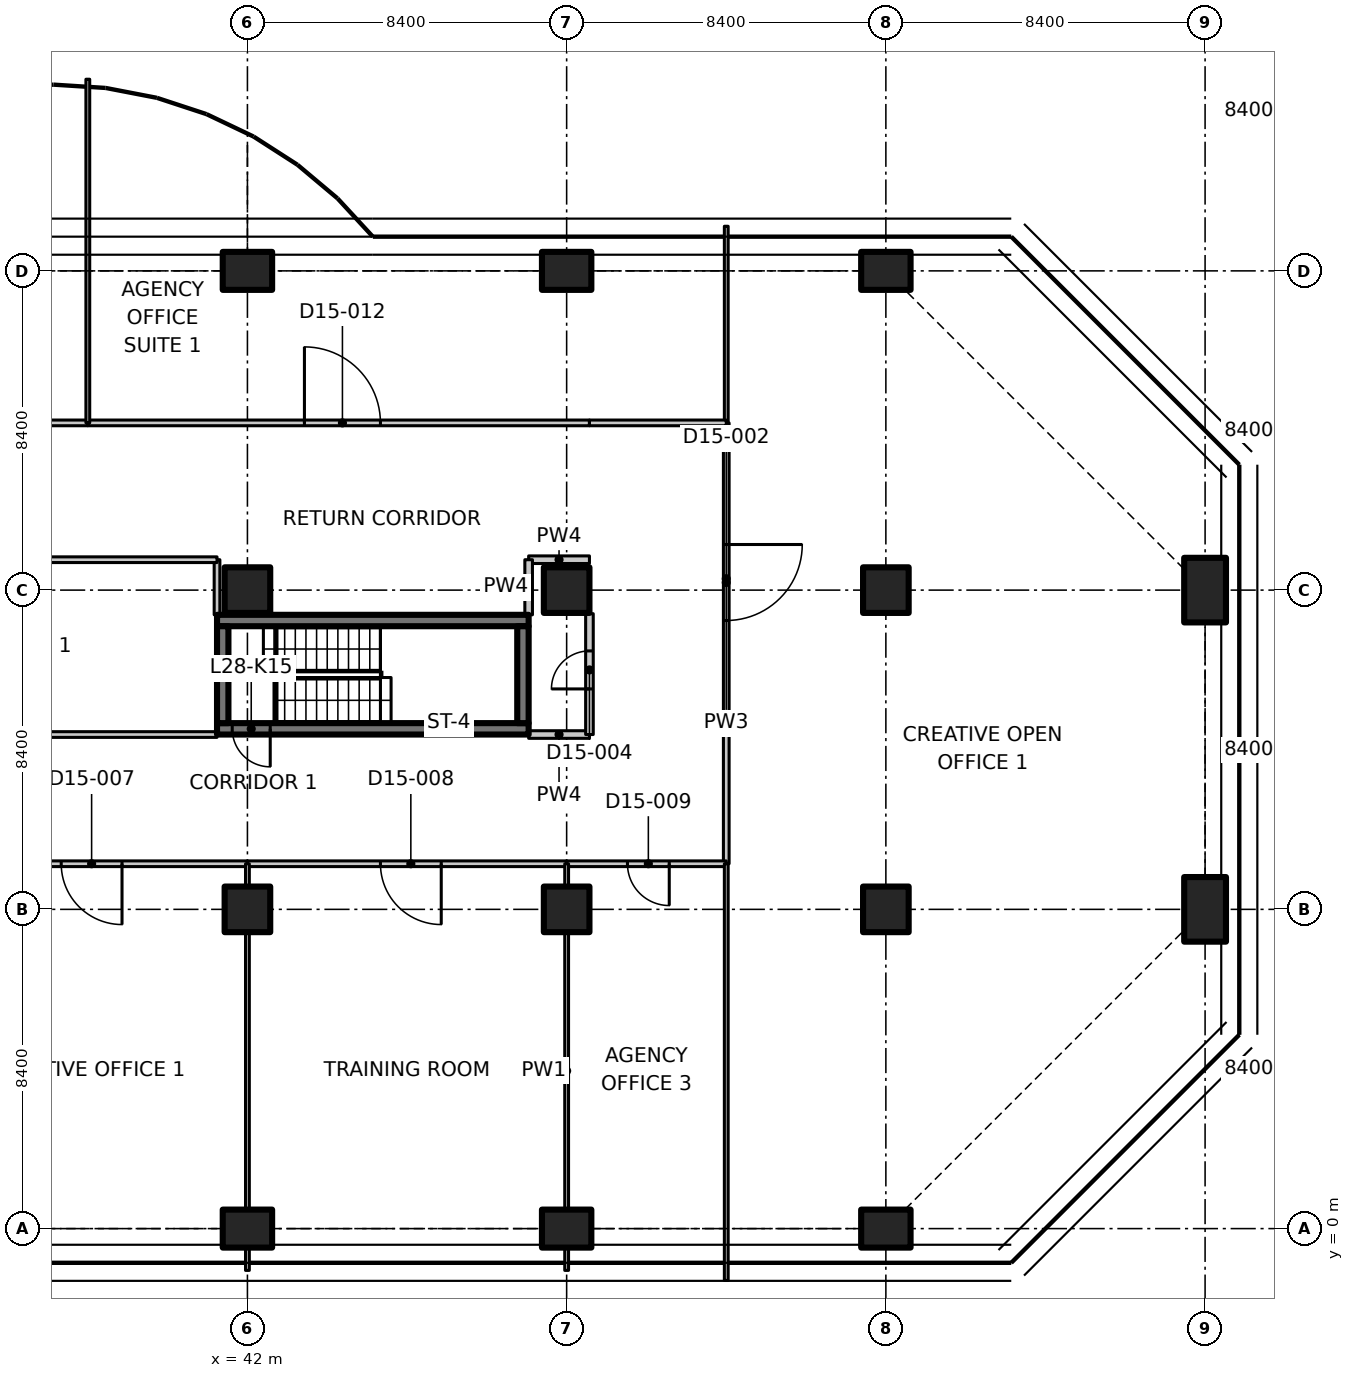
"""IFC4 building model, lengths in metres.
Left out: names, types, materials, properties, quantities, classifications, styles, units other than length and angle.
Written with IfcOpenShell. Run it as: python <this file> out.ifc"""

import sys

from ifc_helpers import new_model, si_unit, direction, frame, frame_2d, origin, origin_2d, place, context, subcontext, project, spatial, polyline, rectangle, outline, extrude, element, fill, save


model = new_model("IFC4")
c1 = context("Model", 3, precision=1e-05, world=origin(), true_north=direction((0.0, 1.0)))
c2 = subcontext(c1, "Body", "Model", "MODEL_VIEW")
j1 = project(units=[si_unit("LENGTHUNIT", "METRE"), si_unit("PLANEANGLEUNIT", "RADIAN")], contexts=[c1])
p1 = place(None, origin())
s1 = spatial("IfcSite", under=j1, at=p1, CompositionType="ELEMENT")
p2 = place(p1, origin())
s2 = spatial("IfcBuilding", under=s1, at=p2, CompositionType="ELEMENT")
p3 = place(p2, frame((0.0, 0.0, 116.9)))
s3 = spatial("IfcBuildingStorey", under=s2, at=p3, CompositionType="ELEMENT", Elevation=116.9)
p4 = place(p3, frame((42.0, 0.0, 0.0), z_axis=(0.0, 0.0, 1.0), x_axis=(0.0, 1.0, 0.0)))
e1 = element("IfcColumn", 1, at=p4, inside=s3, PredefinedType="COLUMN", context=c2, shape_type="SweptSolid", body=[
    extrude(rectangle(XDim=1.0, YDim=1.3, at=origin_2d()), origin(), (0.0, 0.0, 1.0), 3.35),
])
for number, where, z_axis, x_axis in (
    (2, (42.0, 8.4, 0.0), (0.0, 0.0, 1.0), (1.0, 0.0, 0.0)),
    (3, (42.0, 16.8, 0.0), (0.0, 0.0, 1.0), (1.0, 0.0, 0.0)),
):
    element("IfcColumn", number, at=place(p3, frame(where, z_axis=z_axis, x_axis=x_axis)), inside=s3, PredefinedType="COLUMN", context=c2, shape_type="SweptSolid", body=[
        extrude(rectangle(XDim=1.2, YDim=1.2, at=origin_2d()), origin(), (0.0, 0.0, 1.0), 3.35),
    ])
for number, where, z_axis, x_axis in (
    (4, (42.0, 25.2, 0.0), (0.0, 0.0, 1.0), (0.0, 1.0, 0.0)),
    (5, (50.4, 0.0, 0.0), (0.0, 0.0, 1.0), (0.0, 1.0, 0.0)),
):
    element("IfcColumn", number, at=place(p3, frame(where, z_axis=z_axis, x_axis=x_axis)), inside=s3, PredefinedType="COLUMN", context=c2, shape_type="SweptSolid", body=[
        extrude(rectangle(XDim=1.0, YDim=1.3, at=origin_2d()), origin(), (0.0, 0.0, 1.0), 3.35),
    ])
for number, where, z_axis, x_axis in (
    (6, (50.4, 8.4, 0.0), (0.0, 0.0, 1.0), (1.0, 0.0, 0.0)),
    (7, (50.4, 16.8, 0.0), (0.0, 0.0, 1.0), (1.0, 0.0, 0.0)),
):
    element("IfcColumn", number, at=place(p3, frame(where, z_axis=z_axis, x_axis=x_axis)), inside=s3, PredefinedType="COLUMN", context=c2, shape_type="SweptSolid", body=[
        extrude(rectangle(XDim=1.2, YDim=1.2, at=origin_2d()), origin(), (0.0, 0.0, 1.0), 3.35),
    ])
for number, where, z_axis, x_axis in (
    (8, (50.4, 25.2, 0.0), (0.0, 0.0, 1.0), (0.0, 1.0, 0.0)),
    (9, (58.8, 0.0, 0.0), (0.0, 0.0, 1.0), (0.0, 1.0, 0.0)),
):
    element("IfcColumn", number, at=place(p3, frame(where, z_axis=z_axis, x_axis=x_axis)), inside=s3, PredefinedType="COLUMN", context=c2, shape_type="SweptSolid", body=[
        extrude(rectangle(XDim=1.0, YDim=1.3, at=origin_2d()), origin(), (0.0, 0.0, 1.0), 3.35),
    ])
for number, where, z_axis, x_axis in (
    (10, (58.8, 8.4, 0.0), (0.0, 0.0, 1.0), (1.0, 0.0, 0.0)),
    (11, (58.8, 16.8, 0.0), (0.0, 0.0, 1.0), (1.0, 0.0, 0.0)),
):
    element("IfcColumn", number, at=place(p3, frame(where, z_axis=z_axis, x_axis=x_axis)), inside=s3, PredefinedType="COLUMN", context=c2, shape_type="SweptSolid", body=[
        extrude(rectangle(XDim=1.2, YDim=1.2, at=origin_2d()), origin(), (0.0, 0.0, 1.0), 3.35),
    ])
p5 = place(p3, frame((58.8, 25.2, 0.0), z_axis=(0.0, 0.0, 1.0), x_axis=(0.0, 1.0, 0.0)))
e12 = element("IfcColumn", 12, at=p5, inside=s3, PredefinedType="COLUMN", context=c2, shape_type="SweptSolid", body=[
    extrude(rectangle(XDim=1.0, YDim=1.3, at=origin_2d()), origin(), (0.0, 0.0, 1.0), 3.35),
])
for number, where, z_axis, x_axis in (
    (13, (67.2, 8.4, 0.0), (0.0, 0.0, 1.0), (1.0, 0.0, 0.0)),
    (14, (67.2, 16.8, 0.0), (0.0, 0.0, 1.0), (1.0, 0.0, 0.0)),
):
    element("IfcColumn", number, at=place(p3, frame(where, z_axis=z_axis, x_axis=x_axis)), inside=s3, PredefinedType="COLUMN", context=c2, shape_type="SweptSolid", body=[
        extrude(rectangle(XDim=1.1, YDim=1.7, at=origin_2d()), origin(), (0.0, 0.0, 1.0), 3.35),
    ])
p6 = place(p3, frame((49.4, 13.15, 0.0), z_axis=(0.0, 0.0, 1.0), x_axis=(-1.0, 0.0, 0.0)))
e15 = element("IfcWall", 15, at=p6, inside=s3, PredefinedType="SHEAR", context=c2, shape_type="SweptSolid", body=[
    extrude(rectangle(XDim=8.2, YDim=0.3, at=frame_2d((4.1, 0.0))), origin(), (0.0, 0.0, 1.0), 3.35),
])
p7 = place(p6, frame((6.8, 0.0, 0.0)))
e16 = element("IfcOpeningElement", 16, at=p7, cuts=e15, PredefinedType="OPENING", context=c2, shape_type="SweptSolid", body=[
    extrude(rectangle(XDim=1.0, YDim=2.1, at=frame_2d((0.5, 1.05))), frame((0.0, 0.16, 0.0), z_axis=(0.0, -1.0, 0.0), x_axis=(1.0, 0.0, 0.0)), (0.0, 0.0, 1.0), 0.32),
])
p8 = place(p3, frame((41.2, 16.0, 0.0), z_axis=(0.0, 0.0, 1.0), x_axis=(1.0, 0.0, 0.0)))
e17 = element("IfcWall", 17, at=p8, inside=s3, PredefinedType="SHEAR", context=c2, shape_type="SweptSolid", body=[
    extrude(rectangle(XDim=8.2, YDim=0.3, at=frame_2d((4.1, 0.0))), origin(), (0.0, 0.0, 1.0), 3.35),
])
for number, where, z_axis, x_axis in (
    (18, (41.35, 13.3, 0.0), (0.0, 0.0, 1.0), (0.0, 1.0, 0.0)),
    (19, (49.25, 13.3, 0.0), (0.0, 0.0, 1.0), (0.0, 1.0, 0.0)),
):
    element("IfcWall", number, at=place(p3, frame(where, z_axis=z_axis, x_axis=x_axis)), inside=s3, PredefinedType="SHEAR", context=c2, shape_type="SweptSolid", body=[
        extrude(rectangle(XDim=2.55, YDim=0.3, at=frame_2d((1.275, 0.0))), origin(), (0.0, 0.0, 1.0), 3.35),
    ])
p9 = place(p3, frame((54.6, 13.0, 0.0), z_axis=(0.0, 0.0, 1.0), x_axis=(0.0, -1.0, 0.0)))
e20 = element("IfcWall", 20, at=p9, inside=s3, PredefinedType="PARTITIONING", context=c2, shape_type="SweptSolid", body=[
    extrude(rectangle(XDim=3.4, YDim=0.15, at=frame_2d((1.7, 0.0))), origin(), (0.0, 0.0, 1.0), 3.33),
])
p10 = place(p3, frame((29.4, 13.0, 0.0), z_axis=(0.0, 0.0, 1.0), x_axis=(1.0, 0.0, 0.0)))
e21 = element("IfcWall", 21, at=p10, inside=s3, PredefinedType="PARTITIONING", context=c2, shape_type="SweptSolid", body=[
    extrude(rectangle(XDim=11.8, YDim=0.15, at=frame_2d((5.9, 0.0))), origin(), (0.0, 0.0, 1.0), 3.33),
])
p11 = place(p3, frame((49.4, 13.0, 0.0), z_axis=(0.0, 0.0, 1.0), x_axis=(1.0, 0.0, 0.0)))
e22 = element("IfcWall", 22, at=p11, inside=s3, PredefinedType="PARTITIONING", context=c2, shape_type="SweptSolid", body=[
    extrude(rectangle(XDim=1.6, YDim=0.2, at=frame_2d((0.8, 0.0))), origin(), (0.0, 0.0, 1.0), 3.33),
])
p12 = place(p3, frame((42.0, 9.6, 0.0), z_axis=(0.0, 0.0, 1.0), x_axis=(-1.0, 0.0, 0.0)))
e23 = element("IfcWall", 23, at=p12, inside=s3, PredefinedType="PARTITIONING", context=c2, shape_type="SweptSolid", body=[
    extrude(rectangle(XDim=8.4, YDim=0.15, at=frame_2d((4.2, 0.0))), origin(), (0.0, 0.0, 1.0), 3.33),
])
p13 = place(p12, frame((3.3, 0.0, 0.0)))
e24 = element("IfcOpeningElement", 24, at=p13, cuts=e23, PredefinedType="OPENING", context=c2, shape_type="SweptSolid", body=[
    extrude(rectangle(XDim=1.6, YDim=2.1, at=frame_2d((0.8, 1.05))), frame((0.0, 0.085, 0.0), z_axis=(0.0, -1.0, 0.0), x_axis=(1.0, 0.0, 0.0)), (0.0, 0.0, 1.0), 0.17),
])
p14 = place(p3, frame((50.4, 9.6, 0.0), z_axis=(0.0, 0.0, 1.0), x_axis=(-1.0, 0.0, 0.0)))
e25 = element("IfcWall", 25, at=p14, inside=s3, PredefinedType="PARTITIONING", context=c2, shape_type="SweptSolid", body=[
    extrude(rectangle(XDim=8.4, YDim=0.15, at=frame_2d((4.2, 0.0))), origin(), (0.0, 0.0, 1.0), 3.33),
])
p15 = place(p14, frame((3.3, 0.0, 0.0)))
e26 = element("IfcOpeningElement", 26, at=p15, cuts=e25, PredefinedType="OPENING", context=c2, shape_type="SweptSolid", body=[
    extrude(rectangle(XDim=1.6, YDim=2.1, at=frame_2d((0.8, 1.05))), frame((0.0, 0.085, 0.0), z_axis=(0.0, -1.0, 0.0), x_axis=(1.0, 0.0, 0.0)), (0.0, 0.0, 1.0), 0.17),
])
p16 = place(p3, frame((54.6, 9.6, 0.0), z_axis=(0.0, 0.0, 1.0), x_axis=(-1.0, 0.0, 0.0)))
e27 = element("IfcWall", 27, at=p16, inside=s3, PredefinedType="PARTITIONING", context=c2, shape_type="SweptSolid", body=[
    extrude(rectangle(XDim=4.2, YDim=0.15, at=frame_2d((2.1, 0.0))), origin(), (0.0, 0.0, 1.0), 3.33),
])
p17 = place(p16, frame((1.5, 0.0, 0.0)))
e28 = element("IfcOpeningElement", 28, at=p17, cuts=e27, PredefinedType="OPENING", context=c2, shape_type="SweptSolid", body=[
    extrude(rectangle(XDim=1.1, YDim=2.1, at=frame_2d((0.55, 1.05))), frame((0.0, 0.085, 0.0), z_axis=(0.0, -1.0, 0.0), x_axis=(1.0, 0.0, 0.0)), (0.0, 0.0, 1.0), 0.17),
])
p18 = place(p3, frame((54.6, 21.2, 0.0), z_axis=(0.0, 0.0, 1.0), x_axis=(0.0, -1.0, 0.0)))
e29 = element("IfcWall", 29, at=p18, inside=s3, PredefinedType="PARTITIONING", context=c2, shape_type="SweptSolid", body=[
    extrude(rectangle(XDim=8.2, YDim=0.15, at=frame_2d((4.1, 0.0))), origin(), (0.0, 0.0, 1.0), 3.33),
])
p19 = place(p18, frame((3.2, 0.0, 0.0)))
e30 = element("IfcOpeningElement", 30, at=p19, cuts=e29, PredefinedType="OPENING", context=c2, shape_type="SweptSolid", body=[
    extrude(rectangle(XDim=2.0, YDim=2.4, at=frame_2d((1.0, 1.2))), frame((0.0, 0.085, 0.0), z_axis=(0.0, -1.0, 0.0), x_axis=(1.0, 0.0, 0.0)), (0.0, 0.0, 1.0), 0.17),
])
p20 = place(p3, frame((54.6, -1.365, 0.0), z_axis=(0.0, 0.0, 1.0), x_axis=(0.0, 1.0, 0.0)))
e31 = element("IfcWall", 31, at=p20, inside=s3, PredefinedType="PARTITIONING", context=c2, shape_type="SweptSolid", body=[
    extrude(outline(polyline([(0.0, 0.0), (10.965, 0.0), (10.965, 3.33), (1.815, 3.33), (1.813, 2.98), (0.917, 2.98), (0.915, 3.33), (0.265, 3.33), (0.0, 3.33), (0.0, 0.0)])), frame((0.0, 0.05, 0.0), z_axis=(0.0, -1.0, 0.0), x_axis=(1.0, 0.0, 0.0)), (0.0, 0.0, 1.0), 0.1),
])
p21 = place(p3, frame((54.6, 21.2, 0.0), z_axis=(0.0, 0.0, 1.0), x_axis=(0.0, 1.0, 0.0)))
e32 = element("IfcWall", 32, at=p21, inside=s3, PredefinedType="PARTITIONING", context=c2, shape_type="SweptSolid", body=[
    extrude(outline(polyline([(0.0, 0.0), (5.174, 0.0), (5.174, 3.33), (5.1, 3.33), (4.45, 3.33), (4.448, 2.98), (3.552, 2.98), (3.55, 3.33), (0.0, 3.33), (0.0, 0.0)])), frame((0.0, 0.05, 0.0), z_axis=(0.0, -1.0, 0.0), x_axis=(1.0, 0.0, 0.0)), (0.0, 0.0, 1.0), 0.1),
])
p22 = place(p3, frame((41.2, 16.15, 0.0), z_axis=(0.0, 0.0, 1.0), x_axis=(0.0, 1.0, 0.0)))
e33 = element("IfcWall", 33, at=p22, inside=s3, PredefinedType="PARTITIONING", context=c2, shape_type="SweptSolid", body=[
    extrude(rectangle(XDim=1.45, YDim=0.15, at=frame_2d((0.725, 0.0))), origin(), (0.0, 0.0, 1.0), 3.33),
])
p23 = place(p3, frame((41.2, 17.6, 0.0), z_axis=(0.0, 0.0, 1.0), x_axis=(-1.0, 0.0, 0.0)))
e34 = element("IfcWall", 34, at=p23, inside=s3, PredefinedType="PARTITIONING", context=c2, shape_type="SweptSolid", body=[
    extrude(rectangle(XDim=11.8, YDim=0.15, at=frame_2d((5.9, 0.0))), origin(), (0.0, 0.0, 1.0), 3.33),
])
p24 = place(p23, frame((5.4, 0.0, 0.0)))
e35 = element("IfcOpeningElement", 35, at=p24, cuts=e34, PredefinedType="OPENING", context=c2, shape_type="SweptSolid", body=[
    extrude(rectangle(XDim=1.1, YDim=2.1, at=frame_2d((0.55, 1.05))), frame((0.0, 0.085, 0.0), z_axis=(0.0, -1.0, 0.0), x_axis=(1.0, 0.0, 0.0)), (0.0, 0.0, 1.0), 0.17),
])
p25 = place(p3, frame((51.0, 17.6, 0.0), z_axis=(0.0, 0.0, 1.0), x_axis=(-1.0, 0.0, 0.0)))
e36 = element("IfcWall", 36, at=p25, inside=s3, PredefinedType="PARTITIONING", context=c2, shape_type="SweptSolid", body=[
    extrude(rectangle(XDim=1.6, YDim=0.2, at=frame_2d((0.8, 0.0))), origin(), (0.0, 0.0, 1.0), 3.33),
])
p26 = place(p3, frame((49.4, 17.6, 0.0), z_axis=(0.0, 0.0, 1.0), x_axis=(0.0, -1.0, 0.0)))
e37 = element("IfcWall", 37, at=p26, inside=s3, PredefinedType="PARTITIONING", context=c2, shape_type="SweptSolid", body=[
    extrude(rectangle(XDim=1.45, YDim=0.2, at=frame_2d((0.725, 0.0))), origin(), (0.0, 0.0, 1.0), 3.33),
])
p27 = place(p3, frame((33.6, 21.2, 0.0), z_axis=(0.0, 0.0, 1.0), x_axis=(1.0, 0.0, 0.0)))
e38 = element("IfcWall", 38, at=p27, inside=s3, PredefinedType="PARTITIONING", context=c2, shape_type="SweptSolid", body=[
    extrude(rectangle(XDim=4.2, YDim=0.15, at=frame_2d((2.1, 0.0))), origin(), (0.0, 0.0, 1.0), 3.33),
])
p28 = place(p27, frame((1.5, 0.0, 0.0)))
e39 = element("IfcOpeningElement", 39, at=p28, cuts=e38, PredefinedType="OPENING", context=c2, shape_type="SweptSolid", body=[
    extrude(rectangle(XDim=1.1, YDim=2.1, at=frame_2d((0.55, 1.05))), frame((0.0, 0.085, 0.0), z_axis=(0.0, -1.0, 0.0), x_axis=(1.0, 0.0, 0.0)), (0.0, 0.0, 1.0), 0.17),
])
p29 = place(p3, frame((37.8, 21.2, 0.0), z_axis=(0.0, 0.0, 1.0), x_axis=(1.0, 0.0, 0.0)))
e40 = element("IfcWall", 40, at=p29, inside=s3, PredefinedType="PARTITIONING", context=c2, shape_type="SweptSolid", body=[
    extrude(rectangle(XDim=13.2, YDim=0.15, at=frame_2d((6.6, 0.0))), origin(), (0.0, 0.0, 1.0), 3.33),
])
p30 = place(p29, frame((5.7, 0.0, 0.0)))
e41 = element("IfcOpeningElement", 41, at=p30, cuts=e40, PredefinedType="OPENING", context=c2, shape_type="SweptSolid", body=[
    extrude(rectangle(XDim=2.0, YDim=2.4, at=frame_2d((1.0, 1.2))), frame((0.0, 0.085, 0.0), z_axis=(0.0, -1.0, 0.0), x_axis=(1.0, 0.0, 0.0)), (0.0, 0.0, 1.0), 0.17),
])
p31 = place(p3, frame((51.0, 13.0, 0.0), z_axis=(0.0, 0.0, 1.0), x_axis=(0.0, 1.0, 0.0)))
e42 = element("IfcWall", 42, at=p31, inside=s3, PredefinedType="PARTITIONING", context=c2, shape_type="SweptSolid", body=[
    extrude(rectangle(XDim=3.18, YDim=0.2, at=frame_2d((1.59, 0.0))), origin(), (0.0, 0.0, 1.0), 3.33),
])
p32 = place(p31, frame((1.2, 0.0, 0.0)))
e43 = element("IfcOpeningElement", 43, at=p32, cuts=e42, PredefinedType="OPENING", context=c2, shape_type="SweptSolid", body=[
    extrude(rectangle(XDim=1.0, YDim=2.1, at=frame_2d((0.5, 1.05))), frame((0.0, 0.11, 0.0), z_axis=(0.0, -1.0, 0.0), x_axis=(1.0, 0.0, 0.0)), (0.0, 0.0, 1.0), 0.22),
])
p33 = place(p3, frame((51.0, 21.2, 0.0), z_axis=(0.0, 0.0, 1.0), x_axis=(1.0, 0.0, 0.0)))
e44 = element("IfcWall", 44, at=p33, inside=s3, PredefinedType="PARTITIONING", context=c2, shape_type="SweptSolid", body=[
    extrude(rectangle(XDim=3.6, YDim=0.15, at=frame_2d((1.8, 0.0))), origin(), (0.0, 0.0, 1.0), 3.33),
])
p34 = place(p3, frame((42.0, 9.6, 0.0), z_axis=(0.0, 0.0, 1.0), x_axis=(0.0, -1.0, 0.0)))
e45 = element("IfcWall", 45, at=p34, inside=s3, PredefinedType="PARTITIONING", context=c2, shape_type="SweptSolid", body=[
    extrude(rectangle(XDim=0.58, YDim=0.1, at=frame_2d((0.29, 0.0))), origin(), (0.0, 0.0, 1.0), 3.33),
])
p35 = place(p3, frame((42.0, 7.78, 0.0), z_axis=(0.0, 0.0, 1.0), x_axis=(0.0, -1.0, 0.0)))
e46 = element("IfcWall", 46, at=p35, inside=s3, PredefinedType="PARTITIONING", context=c2, shape_type="SweptSolid", body=[
    extrude(rectangle(XDim=7.26, YDim=0.1, at=frame_2d((3.63, 0.0))), origin(), (0.0, 0.0, 1.0), 3.33),
])
for number, where, z_axis, x_axis in (
    (47, (42.0, -0.52, 0.0), (0.0, 0.0, 1.0), (0.0, -1.0, 0.0)),
    (48, (50.4, 9.6, 0.0), (0.0, 0.0, 1.0), (0.0, -1.0, 0.0)),
):
    element("IfcWall", number, at=place(p3, frame(where, z_axis=z_axis, x_axis=x_axis)), inside=s3, PredefinedType="PARTITIONING", context=c2, shape_type="SweptSolid", body=[
        extrude(rectangle(XDim=0.58, YDim=0.1, at=frame_2d((0.29, 0.0))), origin(), (0.0, 0.0, 1.0), 3.33),
    ])
p36 = place(p3, frame((50.4, 7.78, 0.0), z_axis=(0.0, 0.0, 1.0), x_axis=(0.0, -1.0, 0.0)))
e49 = element("IfcWall", 49, at=p36, inside=s3, PredefinedType="PARTITIONING", context=c2, shape_type="SweptSolid", body=[
    extrude(rectangle(XDim=7.26, YDim=0.1, at=frame_2d((3.63, 0.0))), origin(), (0.0, 0.0, 1.0), 3.33),
])
p37 = place(p3, frame((50.4, -0.52, 0.0), z_axis=(0.0, 0.0, 1.0), x_axis=(0.0, -1.0, 0.0)))
e50 = element("IfcWall", 50, at=p37, inside=s3, PredefinedType="PARTITIONING", context=c2, shape_type="SweptSolid", body=[
    extrude(rectangle(XDim=0.58, YDim=0.1, at=frame_2d((0.29, 0.0))), origin(), (0.0, 0.0, 1.0), 3.33),
])
p38 = place(p3, frame((37.8, 30.243, 0.0), z_axis=(0.0, 0.0, 1.0), x_axis=(0.0, -1.0, 0.0)))
e51 = element("IfcWall", 51, at=p38, inside=s3, PredefinedType="PARTITIONING", context=c2, shape_type="SweptSolid", body=[
    extrude(outline(polyline([(0.0, 0.0), (9.043, 0.0), (9.043, 3.33), (5.493, 3.33), (5.491, 2.98), (4.595, 2.98), (4.593, 3.33), (0.0, 3.33), (0.0, 0.0)])), frame((0.0, 0.05, 0.0), z_axis=(0.0, -1.0, 0.0), x_axis=(1.0, 0.0, 0.0)), (0.0, 0.0, 1.0), 0.1),
])
p39 = place(p7, origin())
e52 = element("IfcDoor", 52, at=p39, inside=s3, OperationType="SINGLE_SWING_LEFT", PredefinedType="DOOR", context=c2, shape_type="SweptSolid", body=[
    extrude(rectangle(XDim=1.0, YDim=2.1, at=frame_2d((0.5, 1.05))), frame((0.0, 0.025, 0.0), z_axis=(0.0, -1.0, 0.0), x_axis=(1.0, 0.0, 0.0)), (0.0, 0.0, 1.0), 0.05),
])
fill(e16, e52)
p40 = place(p19, origin())
e53 = element("IfcDoor", 53, at=p40, inside=s3, OperationType="DOUBLE_DOOR_SINGLE_SWING", PredefinedType="DOOR", context=c2, shape_type="SweptSolid", body=[
    extrude(rectangle(XDim=2.0, YDim=2.4, at=frame_2d((1.0, 1.2))), frame((0.0, 0.025, 0.0), z_axis=(0.0, -1.0, 0.0), x_axis=(1.0, 0.0, 0.0)), (0.0, 0.0, 1.0), 0.05),
])
fill(e30, e53)
p41 = place(p32, origin())
e54 = element("IfcDoor", 54, at=p41, inside=s3, OperationType="SINGLE_SWING_LEFT", PredefinedType="DOOR", context=c2, shape_type="SweptSolid", body=[
    extrude(rectangle(XDim=1.0, YDim=2.1, at=frame_2d((0.5, 1.05))), frame((0.0, 0.025, 0.0), z_axis=(0.0, -1.0, 0.0), x_axis=(1.0, 0.0, 0.0)), (0.0, 0.0, 1.0), 0.05),
])
fill(e43, e54)
p42 = place(p13, origin())
e55 = element("IfcDoor", 55, at=p42, inside=s3, OperationType="DOUBLE_DOOR_SINGLE_SWING", PredefinedType="DOOR", context=c2, shape_type="SweptSolid", body=[
    extrude(rectangle(XDim=1.6, YDim=2.1, at=frame_2d((0.8, 1.05))), frame((0.0, 0.025, 0.0), z_axis=(0.0, -1.0, 0.0), x_axis=(1.0, 0.0, 0.0)), (0.0, 0.0, 1.0), 0.05),
])
fill(e24, e55)
p43 = place(p15, origin())
e56 = element("IfcDoor", 56, at=p43, inside=s3, OperationType="DOUBLE_DOOR_SINGLE_SWING", PredefinedType="DOOR", context=c2, shape_type="SweptSolid", body=[
    extrude(rectangle(XDim=1.6, YDim=2.1, at=frame_2d((0.8, 1.05))), frame((0.0, 0.025, 0.0), z_axis=(0.0, -1.0, 0.0), x_axis=(1.0, 0.0, 0.0)), (0.0, 0.0, 1.0), 0.05),
])
fill(e26, e56)
p44 = place(p17, origin())
e57 = element("IfcDoor", 57, at=p44, inside=s3, OperationType="SINGLE_SWING_LEFT", PredefinedType="DOOR", context=c2, shape_type="SweptSolid", body=[
    extrude(rectangle(XDim=1.1, YDim=2.1, at=frame_2d((0.55, 1.05))), frame((0.0, 0.025, 0.0), z_axis=(0.0, -1.0, 0.0), x_axis=(1.0, 0.0, 0.0)), (0.0, 0.0, 1.0), 0.05),
])
fill(e28, e57)
p45 = place(p30, origin())
e58 = element("IfcDoor", 58, at=p45, inside=s3, OperationType="DOUBLE_DOOR_SINGLE_SWING", PredefinedType="DOOR", context=c2, shape_type="SweptSolid", body=[
    extrude(rectangle(XDim=2.0, YDim=2.4, at=frame_2d((1.0, 1.2))), frame((0.0, 0.025, 0.0), z_axis=(0.0, -1.0, 0.0), x_axis=(1.0, 0.0, 0.0)), (0.0, 0.0, 1.0), 0.05),
])
fill(e41, e58)
save(model, sys.argv[1])
